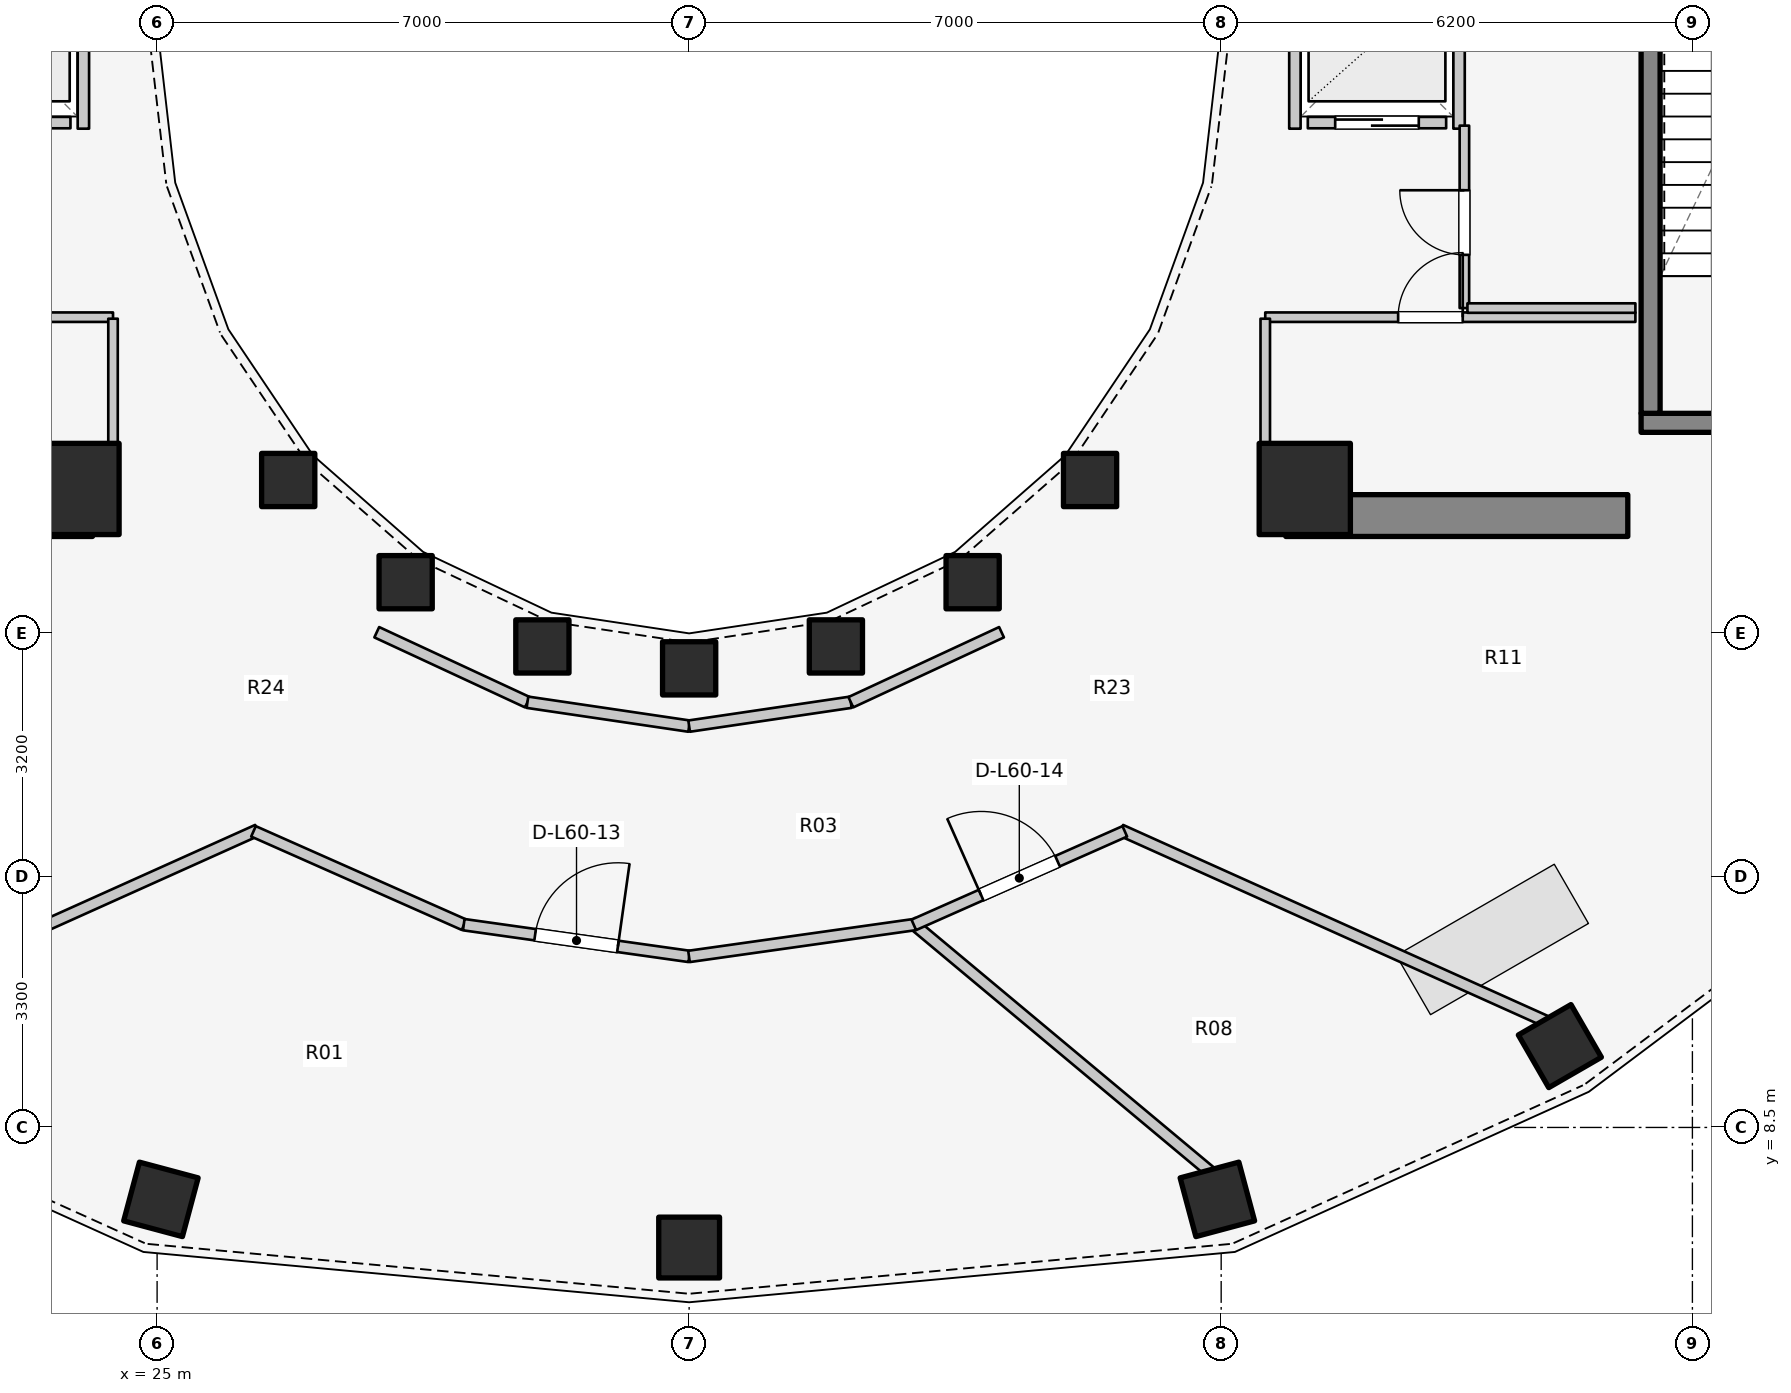
"""IFC4 building model, lengths in metres.
Left out: names, types, materials, properties, quantities, classifications, styles, units other than length and angle.
Written with IfcOpenShell. Run it as: python <this file> out.ifc"""

import sys

from ifc_helpers import new_model, si_unit, direction, frame, frame_2d, origin, origin_2d, place, context, subcontext, project, spatial, rectangle, extrude, element, fill, save


model = new_model("IFC4")
c1 = context("Model", 3, precision=1e-05, world=origin(), true_north=direction((0.0, 1.0)))
c2 = subcontext(c1, "Body", "Model", "MODEL_VIEW")
j1 = project(units=[si_unit("LENGTHUNIT", "METRE"), si_unit("PLANEANGLEUNIT", "RADIAN")], contexts=[c1])
p1 = place(None, origin())
s1 = spatial("IfcSite", under=j1, at=p1, CompositionType="ELEMENT")
p2 = place(p1, origin())
s2 = spatial("IfcBuilding", under=s1, at=p2, CompositionType="ELEMENT")
p3 = place(p2, frame((0.0, 0.0, 197.4)))
s3 = spatial("IfcBuildingStorey", under=s2, at=p3, CompositionType="ELEMENT", Elevation=197.4)
for number, where, z_axis, x_axis in (
    (1, (19.65, 16.55, 0.0), (0.0, 0.0, 1.0), (1.0, 0.0, 0.0)),
    (2, (39.85, 16.55, 0.0), (0.0, 0.0, 1.0), (1.0, 0.0, 0.0)),
):
    element("IfcWall", number, at=place(p3, frame(where, z_axis=z_axis, x_axis=x_axis)), inside=s3, PredefinedType="SHEAR", context=c2, shape_type="SweptSolid", body=[
        extrude(rectangle(XDim=4.5, YDim=0.55, at=frame_2d((2.25, 0.0))), origin(), (0.0, 0.0, 1.0), 4.2),
    ])
p4 = place(p3, frame((44.525, 17.77, 0.0), z_axis=(0.0, 0.0, 1.0), x_axis=(1.0, 0.0, 0.0)))
e3 = element("IfcWall", 3, at=p4, inside=s3, PredefinedType="SOLIDWALL", context=c2, shape_type="SweptSolid", body=[
    extrude(rectangle(XDim=3.37, YDim=0.25, at=frame_2d((1.685, 0.0))), origin(), (0.0, 0.0, 1.0), 4.2),
])
p5 = place(p4, frame((1.135, 0.0, 0.0)))
e4 = element("IfcOpeningElement", 4, at=p5, cuts=e3, PredefinedType="OPENING", context=c2, shape_type="SweptSolid", body=[
    extrude(rectangle(XDim=1.1, YDim=2.1, at=frame_2d((0.55, 1.05))), frame((0.0, 0.135, 0.0), z_axis=(0.0, -1.0, 0.0), x_axis=(1.0, 0.0, 0.0)), (0.0, 0.0, 1.0), 0.27),
])
p6 = place(p3, frame((44.65, 17.895, 0.0), z_axis=(0.0, 0.0, 1.0), x_axis=(0.0, 1.0, 0.0)))
e5 = element("IfcWall", 5, at=p6, inside=s3, PredefinedType="SOLIDWALL", context=c2, shape_type="SweptSolid", body=[
    extrude(rectangle(XDim=7.81, YDim=0.25, at=frame_2d((3.905, 0.0))), origin(), (0.0, 0.0, 1.0), 4.2),
])
for number, where, z_axis, x_axis in (
    (6, (23.9, 16.9, 0.0), (0.0, 0.0, 1.0), (1.0, 0.0, 0.0)),
    (7, (40.1, 16.9, 0.0), (0.0, 0.0, 1.0), (1.0, 0.0, 0.0)),
):
    element("IfcColumn", number, at=place(p3, frame(where, z_axis=z_axis, x_axis=x_axis)), inside=s3, PredefinedType="COLUMN", context=c2, shape_type="SweptSolid", body=[
        extrude(rectangle(XDim=1.2, YDim=1.2, at=origin_2d()), origin(), (0.0, 0.0, 1.0), 4.2),
    ])
for number, where, z_axis, x_axis in (
    (8, (26.725, 17.018, 0.0), (0.0, 0.0, 1.0), (1.0, 0.0, 0.0)),
    (9, (28.27, 15.673, 0.0), (0.0, 0.0, 1.0), (1.0, 0.0, 0.0)),
    (10, (30.069, 14.828, 0.0), (0.0, 0.0, 1.0), (1.0, 0.0, 0.0)),
):
    element("IfcColumn", number, at=place(p3, frame(where, z_axis=z_axis, x_axis=x_axis)), inside=s3, PredefinedType="COLUMN", context=c2, shape_type="SweptSolid", body=[
        extrude(rectangle(XDim=0.7, YDim=0.7, at=origin_2d()), origin(), (0.0, 0.0, 1.0), 4.2),
    ])
p7 = place(p3, frame((25.05, 7.554, 0.0), z_axis=(0.0, 0.0, 1.0), x_axis=(-0.258819045103, -0.965925826289, 0.0)))
e11 = element("IfcColumn", 11, at=p7, inside=s3, PredefinedType="COLUMN", context=c2, shape_type="SweptSolid", body=[
    extrude(rectangle(XDim=0.8, YDim=0.8, at=origin_2d()), origin(), (0.0, 0.0, 1.0), 4.2),
])
p8 = place(p3, frame((32.0, 14.54, 0.0), z_axis=(0.0, 0.0, 1.0), x_axis=(1.0, 0.0, 0.0)))
e12 = element("IfcColumn", 12, at=p8, inside=s3, PredefinedType="COLUMN", context=c2, shape_type="SweptSolid", body=[
    extrude(rectangle(XDim=0.7, YDim=0.7, at=origin_2d()), origin(), (0.0, 0.0, 1.0), 4.2),
])
p9 = place(p3, frame((32.0, 6.92, 0.0), z_axis=(0.0, 0.0, 1.0), x_axis=(0.0, -1.0, 0.0)))
e13 = element("IfcColumn", 13, at=p9, inside=s3, PredefinedType="COLUMN", context=c2, shape_type="SweptSolid", body=[
    extrude(rectangle(XDim=0.8, YDim=0.8, at=origin_2d()), origin(), (0.0, 0.0, 1.0), 4.2),
])
p10 = place(p3, frame((33.931, 14.828, 0.0), z_axis=(0.0, 0.0, 1.0), x_axis=(1.0, 0.0, 0.0)))
e14 = element("IfcColumn", 14, at=p10, inside=s3, PredefinedType="COLUMN", context=c2, shape_type="SweptSolid", body=[
    extrude(rectangle(XDim=0.7, YDim=0.7, at=origin_2d()), origin(), (0.0, 0.0, 1.0), 4.2),
])
p11 = place(p3, frame((38.95, 7.554, 0.0), z_axis=(0.0, 0.0, 1.0), x_axis=(0.258819045103, -0.965925826289, 0.0)))
e15 = element("IfcColumn", 15, at=p11, inside=s3, PredefinedType="COLUMN", context=c2, shape_type="SweptSolid", body=[
    extrude(rectangle(XDim=0.8, YDim=0.8, at=origin_2d()), origin(), (0.0, 0.0, 1.0), 4.2),
])
p12 = place(p3, frame((35.73, 15.673, 0.0), z_axis=(0.0, 0.0, 1.0), x_axis=(1.0, 0.0, 0.0)))
e16 = element("IfcColumn", 16, at=p12, inside=s3, PredefinedType="COLUMN", context=c2, shape_type="SweptSolid", body=[
    extrude(rectangle(XDim=0.7, YDim=0.7, at=origin_2d()), origin(), (0.0, 0.0, 1.0), 4.2),
])
p13 = place(p3, frame((43.456, 9.57, 0.0), z_axis=(0.0, 0.0, 1.0), x_axis=(0.5, -0.866025403784, 0.0)))
e17 = element("IfcColumn", 17, at=p13, inside=s3, PredefinedType="COLUMN", context=c2, shape_type="SweptSolid", body=[
    extrude(rectangle(XDim=0.8, YDim=0.8, at=origin_2d()), origin(), (0.0, 0.0, 1.0), 4.2),
])
p14 = place(p3, frame((37.275, 17.018, 0.0), z_axis=(0.0, 0.0, 1.0), x_axis=(1.0, 0.0, 0.0)))
e18 = element("IfcColumn", 18, at=p14, inside=s3, PredefinedType="COLUMN", context=c2, shape_type="SweptSolid", body=[
    extrude(rectangle(XDim=0.7, YDim=0.7, at=origin_2d()), origin(), (0.0, 0.0, 1.0), 4.2),
])
p15 = place(p3, frame((22.04, 21.72, 0.0), z_axis=(0.0, 0.0, 1.0), x_axis=(1.0, 0.0, 0.0)))
e19 = element("IfcWall", 19, at=p15, inside=s3, PredefinedType="SOLIDWALL", context=c2, shape_type="SweptSolid", body=[
    extrude(rectangle(XDim=1.82, YDim=0.15, at=frame_2d((0.91, 0.0))), origin(), (0.0, 0.0, 1.0), 3.22),
])
p16 = place(p15, frame((0.36, 0.0, 0.0)))
e20 = element("IfcOpeningElement", 20, at=p16, cuts=e19, PredefinedType="OPENING", context=c2, shape_type="SweptSolid", body=[
    extrude(rectangle(XDim=1.1, YDim=2.1, at=frame_2d((0.55, 1.05))), frame((0.0, 0.085, 0.0), z_axis=(0.0, -1.0, 0.0), x_axis=(1.0, 0.0, 0.0)), (0.0, 0.0, 1.0), 0.17),
])
p17 = place(p3, frame((24.03, 21.64, 0.0), z_axis=(0.0, 0.0, 1.0), x_axis=(0.0, 1.0, 0.0)))
e21 = element("IfcWall", 21, at=p17, inside=s3, PredefinedType="SOLIDWALL", context=c2, shape_type="SweptSolid", body=[
    extrude(rectangle(XDim=2.32, YDim=0.15, at=frame_2d((1.16, 0.0))), origin(), (0.0, 0.0, 1.0), 3.22),
])
p18 = place(p3, frame((40.14, 21.72, 0.0), z_axis=(0.0, 0.0, 1.0), x_axis=(1.0, 0.0, 0.0)))
e22 = element("IfcWall", 22, at=p18, inside=s3, PredefinedType="SOLIDWALL", context=c2, shape_type="SweptSolid", body=[
    extrude(rectangle(XDim=1.82, YDim=0.15, at=frame_2d((0.91, 0.0))), origin(), (0.0, 0.0, 1.0), 3.22),
])
p19 = place(p18, frame((0.36, 0.0, 0.0)))
e23 = element("IfcOpeningElement", 23, at=p19, cuts=e22, PredefinedType="OPENING", context=c2, shape_type="SweptSolid", body=[
    extrude(rectangle(XDim=1.1, YDim=2.1, at=frame_2d((0.55, 1.05))), frame((0.0, 0.085, 0.0), z_axis=(0.0, -1.0, 0.0), x_axis=(1.0, 0.0, 0.0)), (0.0, 0.0, 1.0), 0.17),
])
p20 = place(p3, frame((39.97, 21.64, 0.0), z_axis=(0.0, 0.0, 1.0), x_axis=(0.0, 1.0, 0.0)))
e24 = element("IfcWall", 24, at=p20, inside=s3, PredefinedType="SOLIDWALL", context=c2, shape_type="SweptSolid", body=[
    extrude(rectangle(XDim=2.32, YDim=0.15, at=frame_2d((1.16, 0.0))), origin(), (0.0, 0.0, 1.0), 3.22),
])
p21 = place(p3, frame((42.13, 21.64, 0.0), z_axis=(0.0, 0.0, 1.0), x_axis=(0.0, 1.0, 0.0)))
e25 = element("IfcWall", 25, at=p21, inside=s3, PredefinedType="SOLIDWALL", context=c2, shape_type="SweptSolid", body=[
    extrude(rectangle(XDim=2.32, YDim=0.15, at=frame_2d((1.16, 0.0))), origin(), (0.0, 0.0, 1.0), 3.675),
])
p22 = place(p3, frame((19.55, 19.16, 0.0), z_axis=(0.0, 0.0, 1.0), x_axis=(1.0, 0.0, 0.0)))
e26 = element("IfcWall", 26, at=p22, inside=s3, PredefinedType="PARTITIONING", context=c2, shape_type="SweptSolid", body=[
    extrude(rectangle(XDim=4.87, YDim=0.125, at=frame_2d((2.435, 0.0))), origin(), (0.0, 0.0, 1.0), 3.22),
])
p23 = place(p22, frame((2.272, 0.0, 0.0)))
e27 = element("IfcOpeningElement", 27, at=p23, cuts=e26, PredefinedType="OPENING", context=c2, shape_type="SweptSolid", body=[
    extrude(rectangle(XDim=0.85, YDim=2.05, at=frame_2d((0.425, 1.025))), frame((0.0, 0.073, 0.0), z_axis=(0.0, -1.0, 0.0), x_axis=(1.0, 0.0, 0.0)), (0.0, 0.0, 1.0), 0.145),
])
p24 = place(p3, frame((24.42, 17.1, 0.0), z_axis=(0.0, 0.0, 1.0), x_axis=(0.0, 1.0, 0.0)))
e28 = element("IfcWall", 28, at=p24, inside=s3, PredefinedType="PARTITIONING", context=c2, shape_type="SweptSolid", body=[
    extrude(rectangle(XDim=2.04, YDim=0.125, at=frame_2d((1.02, 0.0))), origin(), (0.0, 0.0, 1.0), 3.052),
])
p25 = place(p3, frame((39.58, 19.16, 0.0), z_axis=(0.0, 0.0, 1.0), x_axis=(1.0, 0.0, 0.0)))
e29 = element("IfcWall", 29, at=p25, inside=s3, PredefinedType="PARTITIONING", context=c2, shape_type="SweptSolid", body=[
    extrude(rectangle(XDim=4.87, YDim=0.125, at=frame_2d((2.435, 0.0))), origin(), (0.0, 0.0, 1.0), 3.22),
])
p26 = place(p25, frame((1.748, 0.0, 0.0)))
e30 = element("IfcOpeningElement", 30, at=p26, cuts=e29, PredefinedType="OPENING", context=c2, shape_type="SweptSolid", body=[
    extrude(rectangle(XDim=0.85, YDim=2.05, at=frame_2d((0.425, 1.025))), frame((0.0, 0.073, 0.0), z_axis=(0.0, -1.0, 0.0), x_axis=(1.0, 0.0, 0.0)), (0.0, 0.0, 1.0), 0.145),
])
p27 = place(p3, frame((39.58, 17.1, 0.0), z_axis=(0.0, 0.0, 1.0), x_axis=(0.0, 1.0, 0.0)))
e31 = element("IfcWall", 31, at=p27, inside=s3, PredefinedType="PARTITIONING", context=c2, shape_type="SweptSolid", body=[
    extrude(rectangle(XDim=2.04, YDim=0.125, at=frame_2d((1.02, 0.0))), origin(), (0.0, 0.0, 1.0), 3.052),
])
p28 = place(p3, frame((42.2, 19.28, 0.0), z_axis=(0.0, 0.0, 1.0), x_axis=(0.0, 1.0, 0.0)))
e32 = element("IfcWall", 32, at=p28, inside=s3, PredefinedType="PARTITIONING", context=c2, shape_type="SweptSolid", body=[
    extrude(rectangle(XDim=2.4, YDim=0.125, at=frame_2d((1.2, 0.0))), origin(), (0.0, 0.0, 1.0), 3.675),
])
p29 = place(p28, frame((0.7, 0.0, 0.0)))
e33 = element("IfcOpeningElement", 33, at=p29, cuts=e32, PredefinedType="OPENING", context=c2, shape_type="SweptSolid", body=[
    extrude(rectangle(XDim=0.85, YDim=2.05, at=frame_2d((0.425, 1.025))), frame((0.0, 0.073, 0.0), z_axis=(0.0, -1.0, 0.0), x_axis=(1.0, 0.0, 0.0)), (0.0, 0.0, 1.0), 0.145),
])
p30 = place(p3, frame((42.24, 19.28, 0.0), z_axis=(0.0, 0.0, 1.0), x_axis=(1.0, 0.0, 0.0)))
e34 = element("IfcWall", 34, at=p30, inside=s3, PredefinedType="PARTITIONING", context=c2, shape_type="SweptSolid", body=[
    extrude(rectangle(XDim=2.21, YDim=0.125, at=frame_2d((1.105, 0.0))), origin(), (0.0, 0.0, 1.0), 3.22),
])
p31 = place(p3, frame((27.89, 15.015, 0.0), z_axis=(0.0, 0.0, 1.0), x_axis=(0.906943449489, -0.421252393975, 0.0)))
e35 = element("IfcWall", 35, at=p31, inside=s3, PredefinedType="PARTITIONING", context=c2, shape_type="SweptSolid", body=[
    extrude(rectangle(XDim=2.186, YDim=0.15, at=frame_2d((1.093, 0.0))), origin(), (0.0, 0.0, 1.0), 2.32),
])
for number, where, z_axis, x_axis in (
    (36, (29.873, 14.094, 0.0), (0.0, 0.0, 1.0), (0.989, -0.146, 0.0)),
    (37, (32.0, 13.78, 0.0), (0.0, 0.0, 1.0), (0.989, 0.146, 0.0)),
):
    element("IfcWall", number, at=place(p3, frame(where, z_axis=z_axis, x_axis=x_axis)), inside=s3, PredefinedType="PARTITIONING", context=c2, shape_type="SweptSolid", body=[
        extrude(rectangle(XDim=2.151, YDim=0.15, at=frame_2d((1.075, 0.0))), origin(), (0.0, 0.0, 1.0), 2.32),
    ])
p32 = place(p3, frame((34.127, 14.094, 0.0), z_axis=(0.0, 0.0, 1.0), x_axis=(0.906943449489, 0.421252393975, 0.0)))
e38 = element("IfcWall", 38, at=p32, inside=s3, PredefinedType="PARTITIONING", context=c2, shape_type="SweptSolid", body=[
    extrude(rectangle(XDim=2.186, YDim=0.15, at=frame_2d((1.093, 0.0))), origin(), (0.0, 0.0, 1.0), 2.32),
])
p33 = place(p3, frame((26.321, 12.412, 0.0), z_axis=(0.0, 0.0, 1.0), x_axis=(-0.912031098102, -0.410121050538, 0.0)))
e39 = element("IfcWall", 39, at=p33, inside=s3, PredefinedType="PARTITIONING", context=c2, shape_type="SweptSolid", body=[
    extrude(rectangle(XDim=6.125, YDim=0.15, at=frame_2d((3.063, 0.0))), origin(), (0.0, 0.0, 1.0), 2.32),
])
p34 = place(p3, frame((34.925, 11.199, 0.0), z_axis=(0.0, 0.0, 1.0), x_axis=(0.767598896653, -0.640930521865, 0.0)))
e40 = element("IfcWall", 40, at=p34, inside=s3, PredefinedType="PARTITIONING", context=c2, shape_type="SweptSolid", body=[
    extrude(rectangle(XDim=5.115, YDim=0.15, at=frame_2d((2.558, 0.0))), origin(), (0.0, 0.0, 1.0), 2.32),
])
p35 = place(p3, frame((26.268, 12.396, 0.0), z_axis=(0.0, 0.0, 1.0), x_axis=(0.914156698007, -0.405360989106, 0.0)))
e41 = element("IfcWall", 41, at=p35, inside=s3, PredefinedType="PARTITIONING", context=c2, shape_type="SweptSolid", body=[
    extrude(rectangle(XDim=3.031, YDim=0.15, at=frame_2d((1.515, 0.0))), origin(), (0.0, 0.0, 1.0), 2.32),
])
p36 = place(p3, frame((29.035, 11.168, 0.0), z_axis=(0.0, 0.0, 1.0), x_axis=(0.990224603287, -0.139482024093, 0.0)))
e42 = element("IfcWall", 42, at=p36, inside=s3, PredefinedType="PARTITIONING", context=c2, shape_type="SweptSolid", body=[
    extrude(rectangle(XDim=2.997, YDim=0.15, at=frame_2d((1.498, 0.0))), origin(), (0.0, 0.0, 1.0), 2.32),
])
p37 = place(p36, frame((0.948, 0.0, 0.0)))
e43 = element("IfcOpeningElement", 43, at=p37, cuts=e42, PredefinedType="OPENING", context=c2, shape_type="SweptSolid", body=[
    extrude(rectangle(XDim=1.1, YDim=2.1, at=frame_2d((0.55, 1.05))), frame((0.0, 0.085, 0.0), z_axis=(0.0, -1.0, 0.0), x_axis=(1.0, 0.0, 0.0)), (0.0, 0.0, 1.0), 0.17),
])
p38 = place(p3, frame((31.998, 10.75, 0.0), z_axis=(0.0, 0.0, 1.0), x_axis=(0.990183914421, 0.139770582106, 0.0)))
e44 = element("IfcWall", 44, at=p38, inside=s3, PredefinedType="PARTITIONING", context=c2, shape_type="SweptSolid", body=[
    extrude(rectangle(XDim=3.003, YDim=0.15, at=frame_2d((1.501, 0.0))), origin(), (0.0, 0.0, 1.0), 2.32),
])
p39 = place(p3, frame((37.679, 12.412, 0.0), z_axis=(0.0, 0.0, 1.0), x_axis=(0.912031098102, -0.410121050538, 0.0)))
e45 = element("IfcWall", 45, at=p39, inside=s3, PredefinedType="PARTITIONING", context=c2, shape_type="SweptSolid", body=[
    extrude(rectangle(XDim=6.125, YDim=0.15, at=frame_2d((3.063, 0.0))), origin(), (0.0, 0.0, 1.0), 2.32),
])
p40 = place(p3, frame((34.956, 11.165, 0.0), z_axis=(0.0, 0.0, 1.0), x_axis=(0.914251978061, 0.405146048496, 0.0)))
e46 = element("IfcWall", 46, at=p40, inside=s3, PredefinedType="PARTITIONING", context=c2, shape_type="SweptSolid", body=[
    extrude(rectangle(XDim=3.036, YDim=0.15, at=frame_2d((1.518, 0.0))), origin(), (0.0, 0.0, 1.0), 2.32),
])
p41 = place(p40, frame((0.968, 0.0, 0.0)))
e47 = element("IfcOpeningElement", 47, at=p41, cuts=e46, PredefinedType="OPENING", context=c2, shape_type="SweptSolid", body=[
    extrude(rectangle(XDim=1.1, YDim=2.1, at=frame_2d((0.55, 1.05))), frame((0.0, 0.085, 0.0), z_axis=(0.0, -1.0, 0.0), x_axis=(1.0, 0.0, 0.0)), (0.0, 0.0, 1.0), 0.17),
])
p42 = place(p19, origin())
e48 = element("IfcDoor", 48, at=p42, inside=s3, OperationType="DOUBLE_DOOR_SLIDING", PredefinedType="DOOR", context=c2, shape_type="SweptSolid", body=[
    extrude(rectangle(XDim=1.1, YDim=2.1, at=frame_2d((0.55, 1.05))), frame((0.0, 0.025, 0.0), z_axis=(0.0, -1.0, 0.0), x_axis=(1.0, 0.0, 0.0)), (0.0, 0.0, 1.0), 0.05),
])
fill(e23, e48)
p43 = place(p26, origin())
e49 = element("IfcDoor", 49, at=p43, inside=s3, OperationType="SINGLE_SWING_RIGHT", PredefinedType="DOOR", context=c2, shape_type="SweptSolid", body=[
    extrude(rectangle(XDim=0.85, YDim=2.05, at=frame_2d((0.425, 1.025))), frame((0.0, 0.025, 0.0), z_axis=(0.0, -1.0, 0.0), x_axis=(1.0, 0.0, 0.0)), (0.0, 0.0, 1.0), 0.05),
])
fill(e30, e49)
p44 = place(p29, origin())
e50 = element("IfcDoor", 50, at=p44, inside=s3, OperationType="SINGLE_SWING_RIGHT", PredefinedType="DOOR", context=c2, shape_type="SweptSolid", body=[
    extrude(rectangle(XDim=0.85, YDim=2.05, at=frame_2d((0.425, 1.025))), frame((0.0, 0.025, 0.0), z_axis=(0.0, -1.0, 0.0), x_axis=(1.0, 0.0, 0.0)), (0.0, 0.0, 1.0), 0.05),
])
fill(e33, e50)
p45 = place(p37, origin())
e51 = element("IfcDoor", 51, at=p45, inside=s3, OperationType="SINGLE_SWING_RIGHT", PredefinedType="DOOR", context=c2, shape_type="SweptSolid", body=[
    extrude(rectangle(XDim=1.1, YDim=2.1, at=frame_2d((0.55, 1.05))), frame((0.0, 0.025, 0.0), z_axis=(0.0, -1.0, 0.0), x_axis=(1.0, 0.0, 0.0)), (0.0, 0.0, 1.0), 0.05),
])
fill(e43, e51)
p46 = place(p41, origin())
e52 = element("IfcDoor", 52, at=p46, inside=s3, OperationType="SINGLE_SWING_LEFT", PredefinedType="DOOR", context=c2, shape_type="SweptSolid", body=[
    extrude(rectangle(XDim=1.1, YDim=2.1, at=frame_2d((0.55, 1.05))), frame((0.0, 0.025, 0.0), z_axis=(0.0, -1.0, 0.0), x_axis=(1.0, 0.0, 0.0)), (0.0, 0.0, 1.0), 0.05),
])
fill(e47, e52)
save(model, sys.argv[1])
